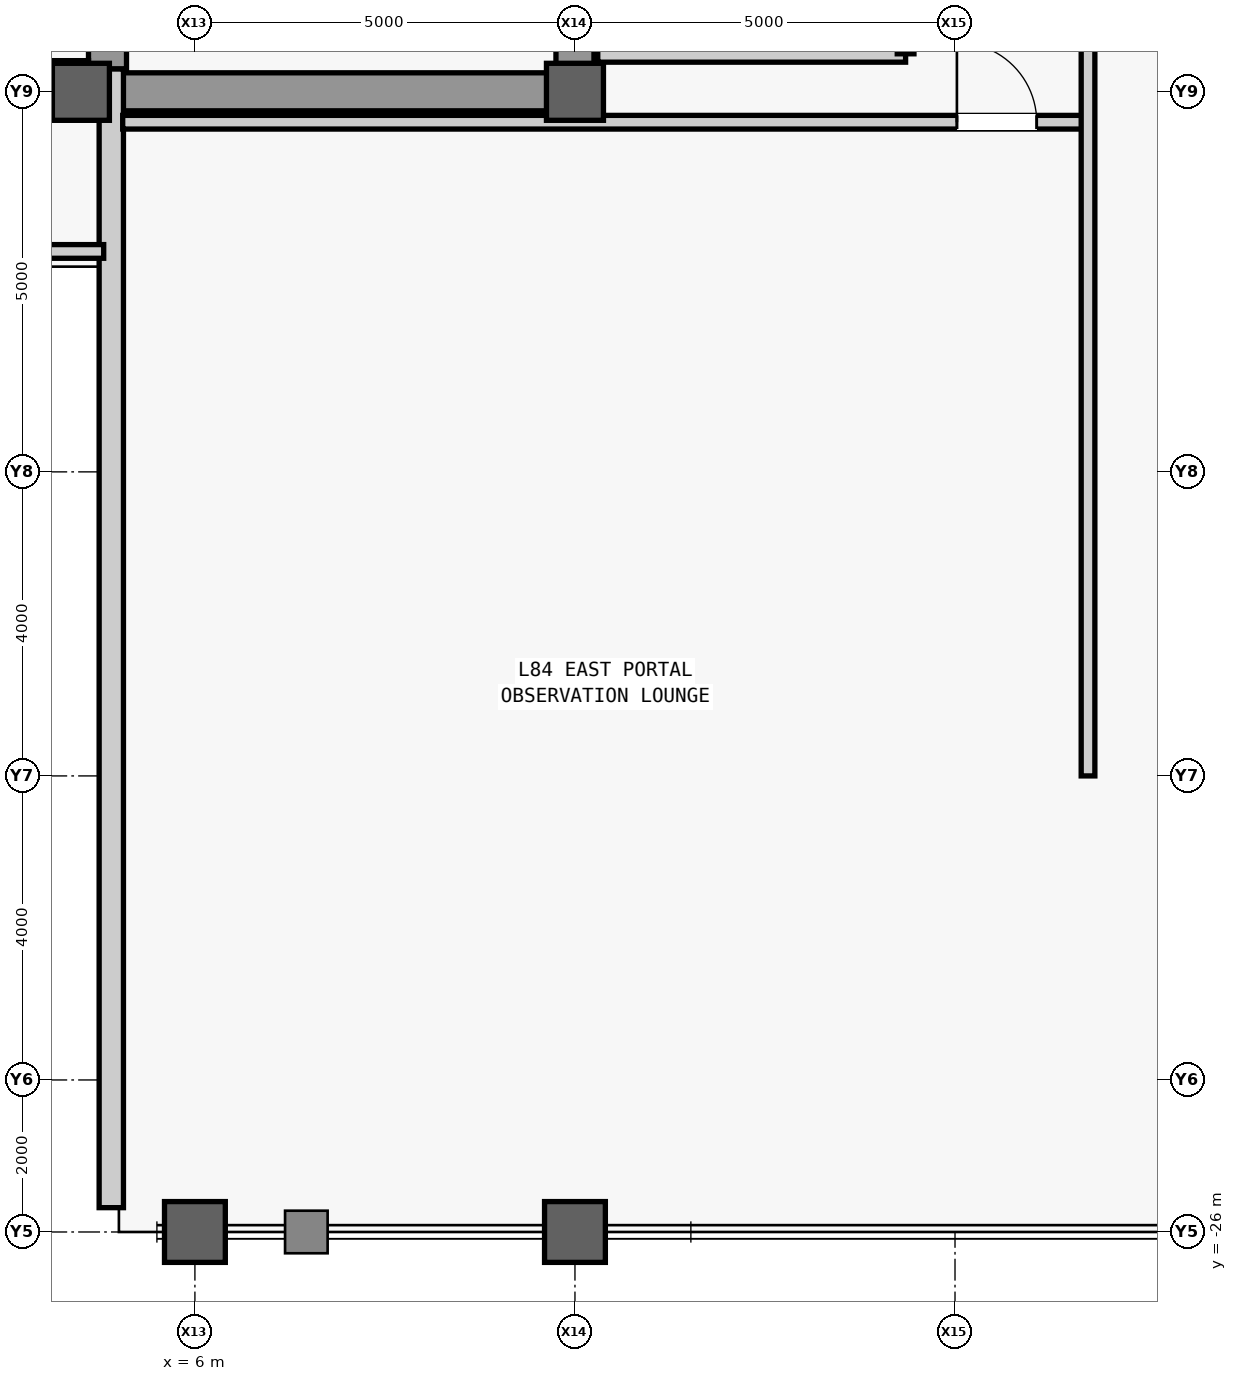
"""IFC4 building model, lengths in metres.
Left out: names, types, materials, properties, quantities, classifications, styles, units other than length and angle.
Written with IfcOpenShell. Run it as: python <this file> out.ifc"""

import sys

from ifc_helpers import new_model, si_unit, direction, frame, frame_2d, origin, origin_2d, place, context, subcontext, project, spatial, rectangle, hollow_rectangle, extrude, source, transform, mapped, element, fill, save


model = new_model("IFC4")
c1 = context("Model", 3, precision=1e-05, world=origin(), true_north=direction((0.0, 1.0)))
c2 = subcontext(c1, "Body", "Model", "MODEL_VIEW")
j1 = project(units=[si_unit("LENGTHUNIT", "METRE"), si_unit("PLANEANGLEUNIT", "RADIAN")], contexts=[c1])
p1 = place(None, origin())
s1 = spatial("IfcSite", under=j1, at=p1, CompositionType="ELEMENT")
p2 = place(p1, origin())
s2 = spatial("IfcBuilding", under=s1, at=p2, CompositionType="ELEMENT")
p3 = place(p2, frame((0.0, 0.0, 354.3)))
s3 = spatial("IfcBuildingStorey", under=s2, at=p3, CompositionType="ELEMENT", Elevation=354.3)
m1 = source(origin(), c2, "Body", "SweptSolid", [
    extrude(rectangle(XDim=22.0, YDim=0.5, at=frame_2d((11.0, 0.0))), origin(), (0.0, 0.0, 1.0), 3.74),
])
p4 = place(p3, frame((11.0, -11.0, 0.0), z_axis=(0.0, 0.0, 1.0), x_axis=(0.0, 1.0, 0.0)))
e1 = element("IfcWall", 1, at=p4, inside=s3, PredefinedType="SHEAR", context=c2, shape_type="MappedRepresentation", body=[
    mapped(m1, transform((0.0, 0.0, 0.0), scale=1.0)),
])
m2 = source(origin(), c2, "Body", "SweptSolid", [
    extrude(rectangle(XDim=1.1, YDim=2.2, at=frame_2d((0.55, 1.1))), frame((0.0, 0.26, 0.0), z_axis=(0.0, -1.0, 0.0), x_axis=(1.0, 0.0, 0.0)), (0.0, 0.0, 1.0), 0.52),
])
p5 = place(p4, frame((0.8, 0.0, 0.0)))
e2 = element("IfcOpeningElement", 2, at=p5, cuts=e1, PredefinedType="OPENING", context=c2, shape_type="MappedRepresentation", body=[
    mapped(m2, transform((0.0, 0.0, 0.0), scale=1.0)),
])
m3 = source(origin(), c2, "Body", "SweptSolid", [
    extrude(rectangle(XDim=0.9, YDim=2.15, at=frame_2d((0.45, 1.075))), frame((0.0, 0.26, 0.0), z_axis=(0.0, -1.0, 0.0), x_axis=(1.0, 0.0, 0.0)), (0.0, 0.0, 1.0), 0.52),
])
p6 = place(p4, frame((7.575, 0.0, 0.0)))
e3 = element("IfcOpeningElement", 3, at=p6, cuts=e1, PredefinedType="OPENING", context=c2, shape_type="MappedRepresentation", body=[
    mapped(m3, transform((0.0, 0.0, 0.0), scale=1.0)),
])
m4 = source(origin(), c2, "Body", "SweptSolid", [
    extrude(rectangle(XDim=1.2, YDim=2.3, at=frame_2d((0.6, 1.15))), frame((0.0, 0.26, 0.0), z_axis=(0.0, -1.0, 0.0), x_axis=(1.0, 0.0, 0.0)), (0.0, 0.0, 1.0), 0.52),
])
p7 = place(p4, frame((17.6, 0.0, 0.0)))
e4 = element("IfcOpeningElement", 4, at=p7, cuts=e1, PredefinedType="OPENING", context=c2, shape_type="MappedRepresentation", body=[
    mapped(m4, transform((0.0, 0.0, 0.0), scale=1.0)),
])
p8 = place(p4, frame((19.6, 0.0, 0.0)))
e5 = element("IfcOpeningElement", 5, at=p8, cuts=e1, PredefinedType="OPENING", context=c2, shape_type="MappedRepresentation", body=[
    mapped(m4, transform((0.0, 0.0, 0.0), scale=1.0)),
])
m5 = source(origin(), c2, "Body", "SweptSolid", [
    extrude(rectangle(XDim=1.3, YDim=2.3, at=frame_2d((0.65, 1.15))), frame((0.0, 0.26, 0.0), z_axis=(0.0, -1.0, 0.0), x_axis=(1.0, 0.0, 0.0)), (0.0, 0.0, 1.0), 0.52),
])
p9 = place(p4, frame((2.7, 0.0, 0.0)))
e6 = element("IfcOpeningElement", 6, at=p9, cuts=e1, PredefinedType="OPENING", context=c2, shape_type="MappedRepresentation", body=[
    mapped(m5, transform((0.0, 0.0, 0.0), scale=1.0)),
])
p10 = place(p4, frame((13.35, 0.0, 0.0)))
e7 = element("IfcOpeningElement", 7, at=p10, cuts=e1, PredefinedType="OPENING", context=c2, shape_type="MappedRepresentation", body=[
    mapped(m5, transform((0.0, 0.0, 0.0), scale=1.0)),
])
m6 = source(origin(), c2, "Body", "SweptSolid", [
    extrude(rectangle(XDim=21.4, YDim=0.5, at=frame_2d((10.7, 0.0))), origin(), (0.0, 0.0, 1.0), 3.74),
])
p11 = place(p3, frame((4.85, -10.7, 0.0), z_axis=(0.0, 0.0, 1.0), x_axis=(0.0, 1.0, 0.0)))
e8 = element("IfcWall", 8, at=p11, inside=s3, PredefinedType="SHEAR", context=c2, shape_type="MappedRepresentation", body=[
    mapped(m6, transform((0.0, 0.0, 0.0), scale=1.0)),
])
m7 = source(origin(), c2, "Body", "SweptSolid", [
    extrude(rectangle(XDim=5.9, YDim=0.5, at=frame_2d((2.95, 0.0))), origin(), (0.0, 0.0, 1.0), 3.74),
])
p12 = place(p3, frame((4.85, -11.0, 0.0), z_axis=(0.0, 0.0, 1.0), x_axis=(1.0, 0.0, 0.0)))
e9 = element("IfcWall", 9, at=p12, inside=s3, PredefinedType="SHEAR", context=c2, shape_type="MappedRepresentation", body=[
    mapped(m7, transform((0.0, 0.0, 0.0), scale=1.0)),
])
m8 = source(origin(), c2, "Body", "SweptSolid", [
    extrude(rectangle(XDim=0.75, YDim=0.75, at=origin_2d()), origin(), (0.0, 0.0, 1.0), 4.0),
])
p13 = place(p3, frame((4.5, -11.0, 0.0), z_axis=(0.0, 0.0, 1.0), x_axis=(1.0, 0.0, 0.0)))
e10 = element("IfcColumn", 10, at=p13, inside=s3, PredefinedType="COLUMN", context=c2, shape_type="MappedRepresentation", body=[
    mapped(m8, transform((0.0, 0.0, 0.0), scale=1.0)),
])
m9 = source(origin(), c2, "Body", "SweptSolid", [
    extrude(hollow_rectangle(XDim=0.8, YDim=0.8, WallThickness=0.045, at=origin_2d()), origin(), (0.0, 0.0, 1.0), 4.0),
])
for number, where, z_axis, x_axis in (
    (11, (6.0, -26.0, 0.0), (0.0, 0.0, 1.0), (1.0, 0.0, 0.0)),
    (12, (11.0, -26.0, 0.0), (0.0, 0.0, 1.0), (1.0, 0.0, 0.0)),
):
    element("IfcColumn", number, at=place(p3, frame(where, z_axis=z_axis, x_axis=x_axis)), inside=s3, PredefinedType="COLUMN", context=c2, shape_type="MappedRepresentation", body=[
        mapped(m9, transform((0.0, 0.0, 0.0), scale=1.0)),
    ])
p14 = place(p3, frame((11.0, -11.0, 0.0), z_axis=(0.0, 0.0, 1.0), x_axis=(1.0, 0.0, 0.0)))
e13 = element("IfcColumn", 13, at=p14, inside=s3, PredefinedType="COLUMN", context=c2, shape_type="MappedRepresentation", body=[
    mapped(m8, transform((0.0, 0.0, 0.0), scale=1.0)),
])
m10 = source(origin(), c2, "Body", "SweptSolid", [
    extrude(rectangle(XDim=14.98, YDim=0.32, at=frame_2d((7.49, 0.0))), origin(), (0.0, 0.0, 1.0), 3.045),
])
p15 = place(p3, frame((4.9, -25.68, 0.0), z_axis=(0.0, 0.0, 1.0), x_axis=(0.0, 1.0, 0.0)))
e14 = element("IfcWall", 14, at=p15, inside=s3, PredefinedType="STANDARD", context=c2, shape_type="MappedRepresentation", body=[
    mapped(m10, transform((0.0, 0.0, 0.0), scale=1.0)),
])
m11 = source(origin(), c2, "Body", "SweptSolid", [
    extrude(rectangle(XDim=4.05, YDim=0.22, at=frame_2d((2.025, 0.0))), origin(), (0.0, 0.0, 1.0), 3.74),
])
p16 = place(p3, frame((11.3, -10.5, 0.0), z_axis=(0.0, 0.0, 1.0), x_axis=(1.0, 0.0, 0.0)))
e15 = element("IfcWall", 15, at=p16, inside=s3, PredefinedType="PARTITIONING", context=c2, shape_type="MappedRepresentation", body=[
    mapped(m11, transform((0.0, 0.0, 0.0), scale=1.0)),
])
m12 = source(origin(), c2, "Body", "SweptSolid", [
    extrude(rectangle(XDim=4.4, YDim=0.22, at=frame_2d((2.2, 0.0))), origin(), (0.0, 0.0, 1.0), 3.74),
])
p17 = place(p3, frame((15.35, -10.5, 0.0), z_axis=(0.0, 0.0, 1.0), x_axis=(0.0, 1.0, 0.0)))
e16 = element("IfcWall", 16, at=p17, inside=s3, PredefinedType="PARTITIONING", context=c2, shape_type="MappedRepresentation", body=[
    mapped(m12, transform((0.0, 0.0, 0.0), scale=1.0)),
])
m13 = source(origin(), c2, "Body", "SweptSolid", [
    extrude(rectangle(XDim=1.2, YDim=2.2, at=frame_2d((0.6, 1.1))), frame((0.0, 0.12, 0.0), z_axis=(0.0, -1.0, 0.0), x_axis=(1.0, 0.0, 0.0)), (0.0, 0.0, 1.0), 0.24),
])
p18 = place(p17, frame((1.6, 0.0, 0.0)))
e17 = element("IfcOpeningElement", 17, at=p18, cuts=e16, PredefinedType="OPENING", context=c2, shape_type="MappedRepresentation", body=[
    mapped(m13, transform((0.0, 0.0, 0.0), scale=1.0)),
])
m14 = source(origin(), c2, "Body", "SweptSolid", [
    extrude(rectangle(XDim=9.2, YDim=0.22, at=frame_2d((4.6, 0.0))), origin(), (0.0, 0.0, 1.0), 2.79),
])
p19 = place(p3, frame((-4.6, -10.7, 0.0), z_axis=(0.0, 0.0, 1.0), x_axis=(1.0, 0.0, 0.0)))
e18 = element("IfcWall", 18, at=p19, inside=s3, PredefinedType="PARTITIONING", context=c2, shape_type="MappedRepresentation", body=[
    mapped(m14, transform((0.0, 0.0, 0.0), scale=1.0)),
])
m15 = source(origin(), c2, "Body", "SweptSolid", [
    extrude(rectangle(XDim=0.95, YDim=2.15, at=frame_2d((0.475, 1.075))), frame((0.0, 0.12, 0.0), z_axis=(0.0, -1.0, 0.0), x_axis=(1.0, 0.0, 0.0)), (0.0, 0.0, 1.0), 0.24),
])
p20 = place(p19, frame((1.075, 0.0, 0.0)))
e19 = element("IfcOpeningElement", 19, at=p20, cuts=e18, PredefinedType="OPENING", context=c2, shape_type="MappedRepresentation", body=[
    mapped(m15, transform((0.0, 0.0, 0.0), scale=1.0)),
])
p21 = place(p19, frame((5.675, 0.0, 0.0)))
e20 = element("IfcOpeningElement", 20, at=p21, cuts=e18, PredefinedType="OPENING", context=c2, shape_type="MappedRepresentation", body=[
    mapped(m15, transform((0.0, 0.0, 0.0), scale=1.0)),
])
m16 = source(origin(), c2, "Body", "SweptSolid", [
    extrude(rectangle(XDim=22.55, YDim=0.18, at=frame_2d((11.275, 0.0))), origin(), (0.0, 0.0, 1.0), 3.74),
])
p22 = place(p3, frame((-17.75, -13.1, 0.0), z_axis=(0.0, 0.0, 1.0), x_axis=(1.0, 0.0, 0.0)))
e21 = element("IfcWall", 21, at=p22, inside=s3, PredefinedType="PARTITIONING", context=c2, shape_type="MappedRepresentation", body=[
    mapped(m16, transform((0.0, 0.0, 0.0), scale=1.0)),
])
m17 = source(origin(), c2, "Body", "SweptSolid", [
    extrude(rectangle(XDim=1.05, YDim=2.2, at=frame_2d((0.525, 1.1))), frame((0.0, 0.1, 0.0), z_axis=(0.0, -1.0, 0.0), x_axis=(1.0, 0.0, 0.0)), (0.0, 0.0, 1.0), 0.2),
])
p23 = place(p22, frame((0.675, 0.0, 0.0)))
e22 = element("IfcOpeningElement", 22, at=p23, cuts=e21, PredefinedType="OPENING", context=c2, shape_type="MappedRepresentation", body=[
    mapped(m17, transform((0.0, 0.0, 0.0), scale=1.0)),
])
m18 = source(origin(), c2, "Body", "SweptSolid", [
    extrude(rectangle(XDim=12.7, YDim=0.18, at=frame_2d((6.35, 0.0))), origin(), (0.0, 0.0, 1.0), 2.79),
])
p24 = place(p3, frame((5.05, -11.4, 0.0), z_axis=(0.0, 0.0, 1.0), x_axis=(1.0, 0.0, 0.0)))
e23 = element("IfcWall", 23, at=p24, inside=s3, PredefinedType="PARTITIONING", context=c2, shape_type="MappedRepresentation", body=[
    mapped(m18, transform((0.0, 0.0, 0.0), scale=1.0)),
])
p25 = place(p24, frame((10.975, 0.0, 0.0)))
e24 = element("IfcOpeningElement", 24, at=p25, cuts=e23, PredefinedType="OPENING", context=c2, shape_type="MappedRepresentation", body=[
    mapped(m17, transform((0.0, 0.0, 0.0), scale=1.0)),
])
m19 = source(origin(), c2, "Body", "SweptSolid", [
    extrude(rectangle(XDim=40.0, YDim=0.18, at=frame_2d((20.0, 0.0))), origin(), (0.0, 0.0, 1.0), 3.74),
])
p26 = place(p3, frame((17.75, -20.0, 0.0), z_axis=(0.0, 0.0, 1.0), x_axis=(0.0, 1.0, 0.0)))
e25 = element("IfcWall", 25, at=p26, inside=s3, PredefinedType="PARTITIONING", context=c2, shape_type="MappedRepresentation", body=[
    mapped(m19, transform((0.0, 0.0, 0.0), scale=1.0)),
])
m20 = source(origin(), c2, "Body", "SweptSolid", [
    extrude(rectangle(XDim=0.95, YDim=2.15, at=frame_2d((0.475, 1.075))), frame((0.0, 0.1, 0.0), z_axis=(0.0, -1.0, 0.0), x_axis=(1.0, 0.0, 0.0)), (0.0, 0.0, 1.0), 0.2),
])
p27 = place(p26, frame((11.161, 0.0, 0.0)))
e26 = element("IfcOpeningElement", 26, at=p27, cuts=e25, PredefinedType="OPENING", context=c2, shape_type="MappedRepresentation", body=[
    mapped(m20, transform((0.0, 0.0, 0.0), scale=1.0)),
])
p28 = place(p26, frame((16.789, 0.0, 0.0)))
e27 = element("IfcOpeningElement", 27, at=p28, cuts=e25, PredefinedType="OPENING", context=c2, shape_type="MappedRepresentation", body=[
    mapped(m20, transform((0.0, 0.0, 0.0), scale=1.0)),
])
p29 = place(p26, frame((22.945, 0.0, 0.0)))
e28 = element("IfcOpeningElement", 28, at=p29, cuts=e25, PredefinedType="OPENING", context=c2, shape_type="MappedRepresentation", body=[
    mapped(m20, transform((0.0, 0.0, 0.0), scale=1.0)),
])
p30 = place(p26, frame((28.967, 0.0, 0.0)))
e29 = element("IfcOpeningElement", 29, at=p30, cuts=e25, PredefinedType="OPENING", context=c2, shape_type="MappedRepresentation", body=[
    mapped(m20, transform((0.0, 0.0, 0.0), scale=1.0)),
])
m21 = source(origin(), c2, "Body", "SweptSolid", [
    extrude(rectangle(XDim=1.05, YDim=2.2, at=frame_2d((0.525, 1.1))), frame((0.0, 0.025, 0.0), z_axis=(0.0, -1.0, 0.0), x_axis=(1.0, 0.0, 0.0)), (0.0, 0.0, 1.0), 0.05),
])
p31 = place(p25, origin())
e30 = element("IfcDoor", 30, at=p31, inside=s3, OperationType="SINGLE_SWING_LEFT", PredefinedType="DOOR", context=c2, shape_type="MappedRepresentation", body=[
    mapped(m21, transform((0.0, 0.0, 0.0), scale=1.0)),
])
fill(e24, e30)
save(model, sys.argv[1])
